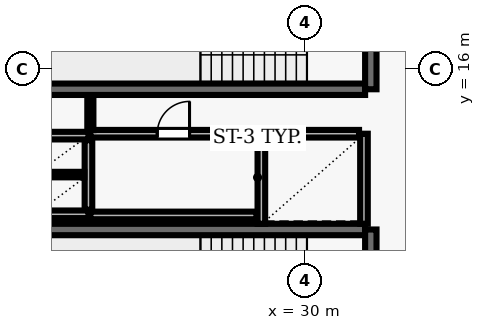
"""IFC4 building model, lengths in metres.
Left out: names, types, materials, properties, quantities, classifications, styles, units other than length and angle.
Written with IfcOpenShell. Run it as: python <this file> out.ifc"""

import sys

from ifc_helpers import new_model, si_unit, direction, frame, frame_2d, origin, place, context, subcontext, project, spatial, rectangle, extrude, element, fill, save


model = new_model("IFC4")
c1 = context("Model", 3, precision=1e-05, world=origin(), true_north=direction((0.0, 1.0)))
c2 = subcontext(c1, "Body", "Model", "MODEL_VIEW")
j1 = project(units=[si_unit("LENGTHUNIT", "METRE"), si_unit("PLANEANGLEUNIT", "RADIAN")], contexts=[c1])
p1 = place(None, origin())
s1 = spatial("IfcSite", under=j1, at=p1, CompositionType="ELEMENT")
p2 = place(p1, origin())
s2 = spatial("IfcBuilding", under=s1, at=p2, CompositionType="ELEMENT")
p3 = place(p2, frame((0.0, 0.0, 122.9)))
s3 = spatial("IfcBuildingStorey", under=s2, at=p3, CompositionType="ELEMENT", Elevation=122.9)
p4 = place(p3, frame((23.22, 15.47, 0.0), z_axis=(0.0, 0.0, 1.0), x_axis=(1.0, 0.0, 0.0)))
e1 = element("IfcWall", 1, at=p4, inside=s3, PredefinedType="SHEAR", context=c2, shape_type="SweptSolid", body=[
    extrude(rectangle(XDim=8.36, YDim=0.3, at=frame_2d((4.18, 0.0))), origin(), (0.0, 0.0, 1.0), 3.69),
])
p5 = place(p3, frame((31.73, 15.47, 0.0), z_axis=(0.0, 0.0, 1.0), x_axis=(0.0, 1.0, 0.0)))
e2 = element("IfcWall", 2, at=p5, inside=s3, PredefinedType="SHEAR", context=c2, shape_type="SweptSolid", body=[
    extrude(rectangle(XDim=3.51, YDim=0.3, at=frame_2d((1.755, 0.0))), origin(), (0.0, 0.0, 1.0), 3.69),
])
p6 = place(p5, frame((1.18, 0.0, 0.0)))
e3 = element("IfcOpeningElement", 3, at=p6, cuts=e2, PredefinedType="OPENING", context=c2, shape_type="SweptSolid", body=[
    extrude(rectangle(XDim=1.15, YDim=2.15, at=frame_2d((0.575, 1.075))), frame((0.0, 0.16, 0.0), z_axis=(0.0, -1.0, 0.0), x_axis=(1.0, 0.0, 0.0)), (0.0, 0.0, 1.0), 0.32),
])
p7 = place(p3, frame((31.58, 11.78, 0.0), z_axis=(0.0, 0.0, 1.0), x_axis=(-1.0, 0.0, 0.0)))
e4 = element("IfcWall", 4, at=p7, inside=s3, PredefinedType="SHEAR", context=c2, shape_type="SweptSolid", body=[
    extrude(rectangle(XDim=8.36, YDim=0.3, at=frame_2d((4.18, 0.0))), origin(), (0.0, 0.0, 1.0), 3.69),
])
p8 = place(p3, frame((31.73, 8.27, 0.0), z_axis=(0.0, 0.0, 1.0), x_axis=(0.0, 1.0, 0.0)))
e5 = element("IfcWall", 5, at=p8, inside=s3, PredefinedType="SHEAR", context=c2, shape_type="SweptSolid", body=[
    extrude(rectangle(XDim=3.51, YDim=0.3, at=frame_2d((1.755, 0.0))), origin(), (0.0, 0.0, 1.0), 3.69),
])
p9 = place(p8, frame((1.18, 0.0, 0.0)))
e6 = element("IfcOpeningElement", 6, at=p9, cuts=e5, PredefinedType="OPENING", context=c2, shape_type="SweptSolid", body=[
    extrude(rectangle(XDim=1.15, YDim=2.15, at=frame_2d((0.575, 1.075))), frame((0.0, 0.16, 0.0), z_axis=(0.0, -1.0, 0.0), x_axis=(1.0, 0.0, 0.0)), (0.0, 0.0, 1.0), 0.32),
])
for number, where, z_axis, x_axis in (
    (7, (28.85, 14.3, 0.0), (0.0, 0.0, 1.0), (0.0, -1.0, 0.0)),
    (8, (31.55, 11.93, 0.0), (0.0, 0.0, 1.0), (0.0, 1.0, 0.0)),
):
    element("IfcWall", number, at=place(p3, frame(where, z_axis=z_axis, x_axis=x_axis)), inside=s3, PredefinedType="SOLIDWALL", context=c2, shape_type="SweptSolid", body=[
        extrude(rectangle(XDim=2.37, YDim=0.2, at=frame_2d((1.185, 0.0))), origin(), (0.0, 0.0, 1.0), 3.69),
    ])
p10 = place(p3, frame((31.42, 14.3, 0.0), z_axis=(0.0, 0.0, 1.0), x_axis=(-1.0, 0.0, 0.0)))
e9 = element("IfcWall", 9, at=p10, inside=s3, PredefinedType="SOLIDWALL", context=c2, shape_type="SweptSolid", body=[
    extrude(rectangle(XDim=2.44, YDim=0.2, at=frame_2d((1.22, 0.0))), origin(), (0.0, 0.0, 1.0), 3.69),
])
for number, where, z_axis, x_axis in (
    (10, (22.9, 14.25, 0.0), (0.0, 0.0, 1.0), (1.0, 0.0, 0.0)),
    (11, (22.9, 12.18, 0.0), (0.0, 0.0, 1.0), (1.0, 0.0, 0.0)),
):
    element("IfcWall", number, at=place(p3, frame(where, z_axis=z_axis, x_axis=x_axis)), inside=s3, PredefinedType="SOLIDWALL", context=c2, shape_type="SweptSolid", body=[
        extrude(rectangle(XDim=1.4, YDim=0.2, at=frame_2d((0.7, 0.0))), origin(), (0.0, 0.0, 1.0), 3.69),
    ])
p11 = place(p3, frame((24.3, 12.3, 0.0), z_axis=(0.0, 0.0, 1.0), x_axis=(0.0, 1.0, 0.0)))
e12 = element("IfcWall", 12, at=p11, inside=s3, PredefinedType="SOLIDWALL", context=c2, shape_type="SweptSolid", body=[
    extrude(rectangle(XDim=1.83, YDim=0.2, at=frame_2d((0.915, 0.0))), origin(), (0.0, 0.0, 1.0), 3.69),
])
p12 = place(p3, frame((23.01, 13.225, 0.0), z_axis=(0.0, 0.0, 1.0), x_axis=(1.0, 0.0, 0.0)))
e13 = element("IfcWall", 13, at=p12, inside=s3, PredefinedType="PARTITIONING", context=c2, shape_type="SweptSolid", body=[
    extrude(rectangle(XDim=1.18, YDim=0.145, at=frame_2d((0.59, 0.0))), origin(), (0.0, 0.0, 1.0), 3.69),
])
p13 = place(p3, frame((24.35, 12.15, 0.0), z_axis=(0.0, 0.0, 1.0), x_axis=(1.0, 0.0, 0.0)))
e14 = element("IfcWall", 14, at=p13, inside=s3, PredefinedType="SOLIDWALL", context=c2, shape_type="SweptSolid", body=[
    extrude(rectangle(XDim=4.37, YDim=0.2, at=frame_2d((2.185, 0.0))), origin(), (0.0, 0.0, 1.0), 3.69),
])
p14 = place(p3, frame((24.35, 14.3, 0.0), z_axis=(0.0, 0.0, 1.0), x_axis=(1.0, 0.0, 0.0)))
e15 = element("IfcWall", 15, at=p14, inside=s3, PredefinedType="SOLIDWALL", context=c2, shape_type="SweptSolid", body=[
    extrude(rectangle(XDim=4.37, YDim=0.2, at=frame_2d((2.185, 0.0))), origin(), (0.0, 0.0, 1.0), 3.69),
])
p15 = place(p14, frame((1.76, 0.0, 0.0)))
e16 = element("IfcOpeningElement", 16, at=p15, cuts=e15, PredefinedType="OPENING", context=c2, shape_type="SweptSolid", body=[
    extrude(rectangle(XDim=0.85, YDim=2.1, at=frame_2d((0.425, 1.05))), frame((0.0, 0.11, 0.0), z_axis=(0.0, -1.0, 0.0), x_axis=(1.0, 0.0, 0.0)), (0.0, 0.0, 1.0), 0.22),
])
p16 = place(p3, frame((24.35, 15.29, 0.0), z_axis=(0.0, 0.0, 1.0), x_axis=(0.0, -1.0, 0.0)))
e17 = element("IfcWall", 17, at=p16, inside=s3, PredefinedType="PARTITIONING", context=c2, shape_type="SweptSolid", body=[
    extrude(rectangle(XDim=0.895, YDim=0.16, at=frame_2d((0.448, 0.0))), origin(), (0.0, 0.0, 1.0), 3.69),
])
p17 = place(p15, origin())
e18 = element("IfcDoor", 18, at=p17, inside=s3, OperationType="SINGLE_SWING_RIGHT", PredefinedType="DOOR", context=c2, shape_type="SweptSolid", body=[
    extrude(rectangle(XDim=0.85, YDim=2.1, at=frame_2d((0.425, 1.05))), frame((0.0, 0.025, 0.0), z_axis=(0.0, -1.0, 0.0), x_axis=(1.0, 0.0, 0.0)), (0.0, 0.0, 1.0), 0.05),
])
fill(e16, e18)
save(model, sys.argv[1])
